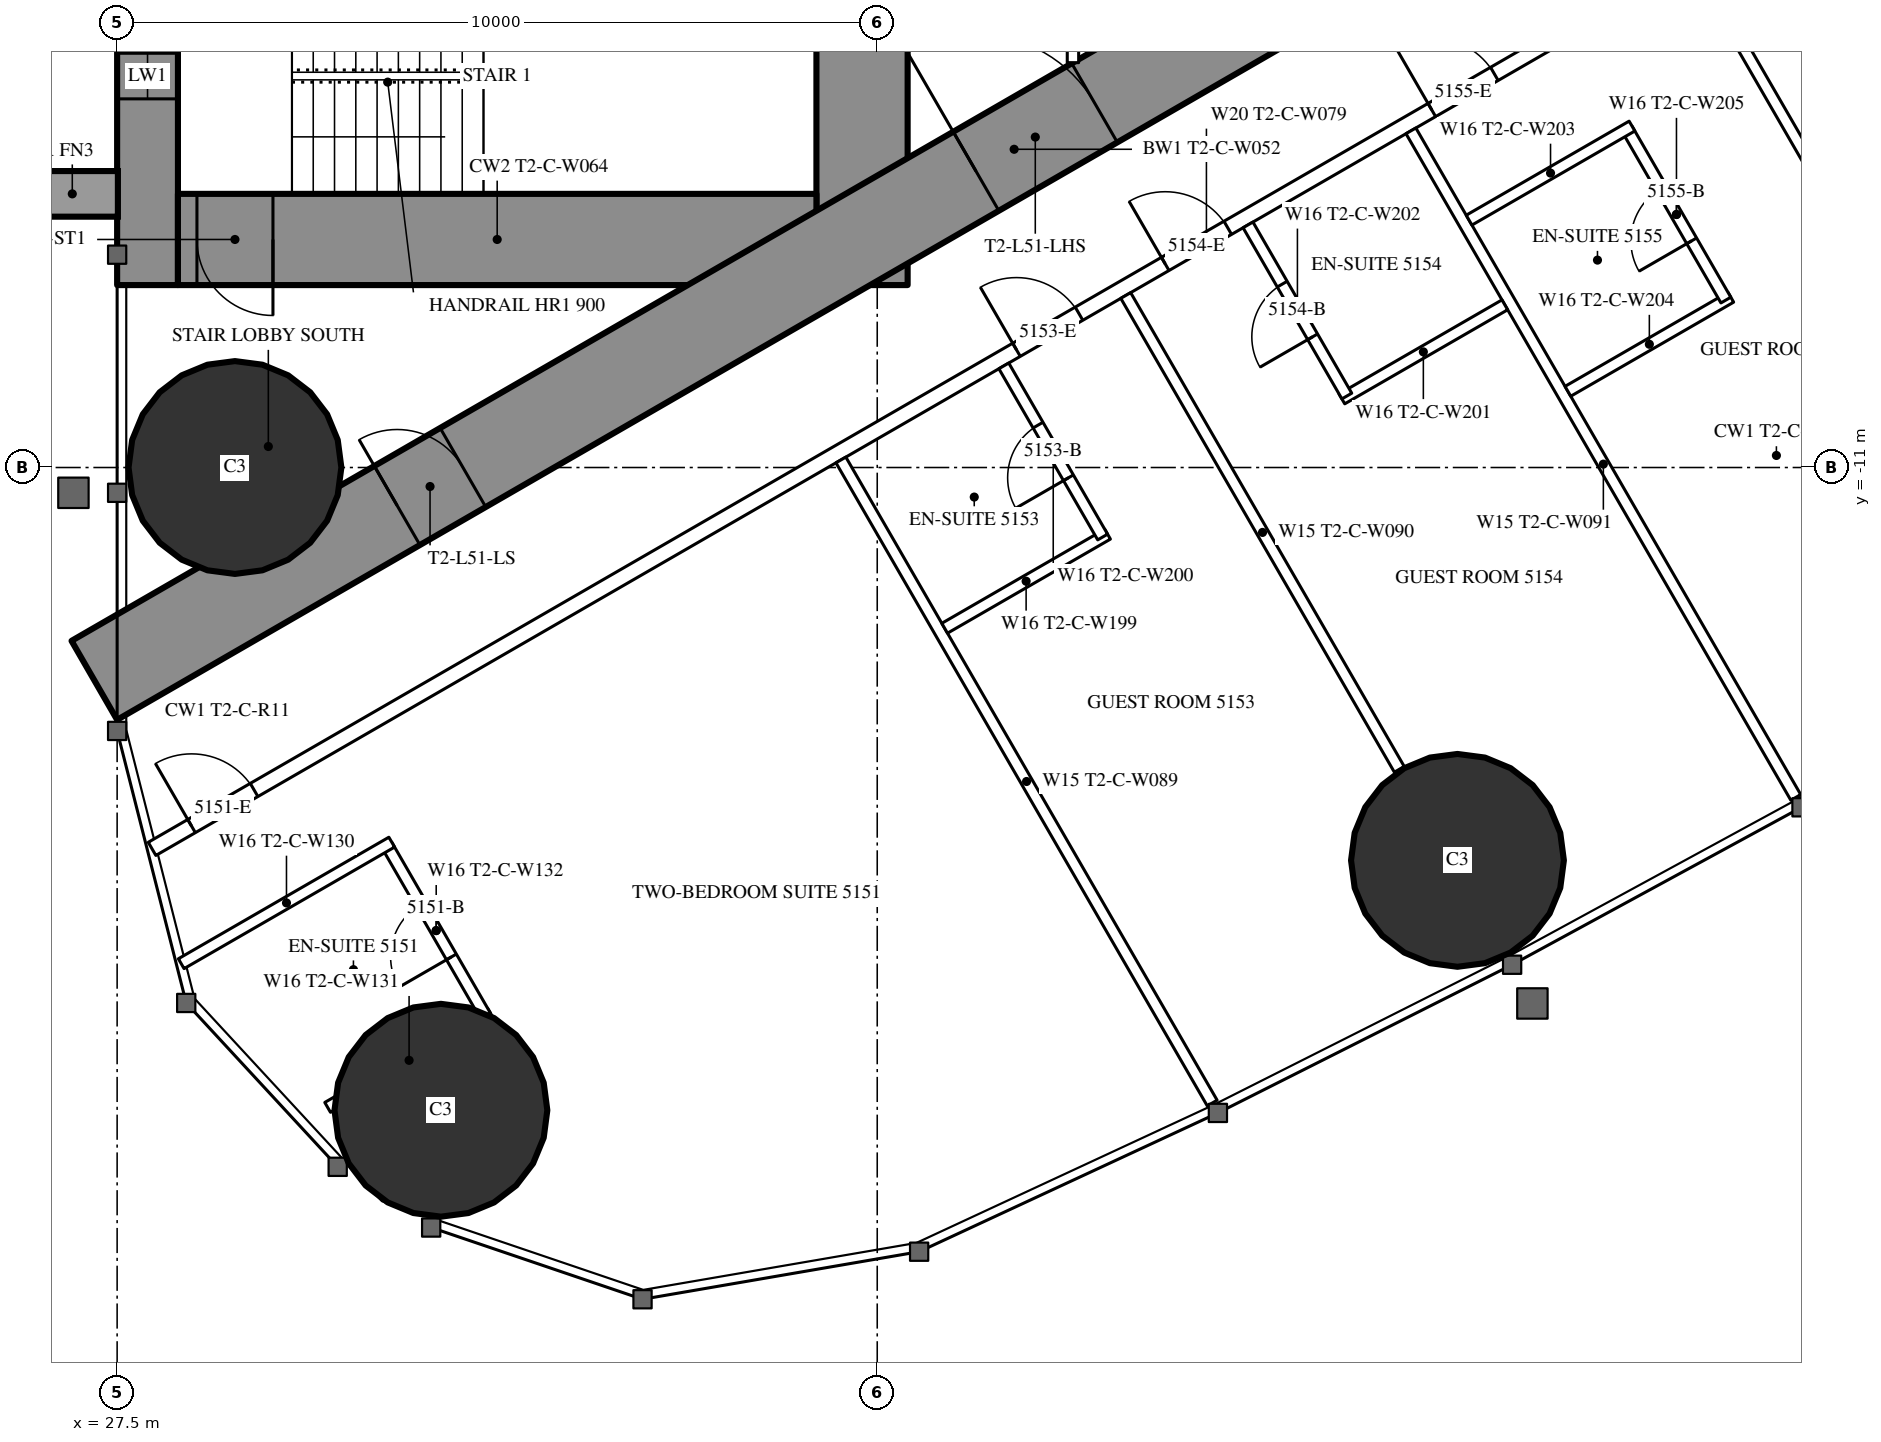
"""IFC4 building model, lengths in metres.
Left out: names, types, materials, properties, quantities, classifications, styles, units other than length and angle.
Written with IfcOpenShell. Run it as: python <this file> out.ifc"""

import sys

from ifc_helpers import new_model, si_unit, direction, frame, frame_2d, origin, origin_2d, place, context, subcontext, project, spatial, rectangle, circle, extrude, element, fill, save


model = new_model("IFC4")
c1 = context("Model", 3, precision=1e-05, world=origin(), true_north=direction((0.0, 1.0)))
c2 = subcontext(c1, "Body", "Model", "MODEL_VIEW")
j1 = project(units=[si_unit("LENGTHUNIT", "METRE"), si_unit("PLANEANGLEUNIT", "RADIAN")], contexts=[c1])
p1 = place(None, origin())
s1 = spatial("IfcSite", under=j1, at=p1, CompositionType="ELEMENT")
p2 = place(p1, origin())
s2 = spatial("IfcBuilding", under=s1, at=p2, CompositionType="ELEMENT")
p3 = place(p2, frame((0.0, 0.0, 191.3)))
s3 = spatial("IfcBuildingStorey", under=s2, at=p3, CompositionType="ELEMENT", Elevation=191.3)
for number, where, z_axis, x_axis in (
    (1, (31.76, -19.456, 0.0), (0.0, 0.0, 1.0), (1.0, 0.0, 0.0)),
    (2, (29.05, -11.0, 0.0), (0.0, 0.0, 1.0), (1.0, 0.0, 0.0)),
    (3, (45.134, -16.168, 0.0), (0.0, 0.0, 1.0), (1.0, 0.0, 0.0)),
):
    element("IfcColumn", number, at=place(p3, frame(where, z_axis=z_axis, x_axis=x_axis)), inside=s3, PredefinedType="COLUMN", context=c2, shape_type="SweptSolid", body=[
        extrude(circle(Radius=1.4, at=origin_2d()), origin(), (0.0, 0.0, 1.0), 3.5),
    ])
p4 = place(p3, frame((27.9, -8.6, 0.0), z_axis=(0.0, 0.0, 1.0), x_axis=(0.0, 1.0, 0.0)))
e4 = element("IfcWall", 4, at=p4, inside=s3, PredefinedType="SHEAR", context=c2, shape_type="SweptSolid", body=[
    extrude(rectangle(XDim=17.2, YDim=0.8, at=frame_2d((8.6, 0.0))), origin(), (0.0, 0.0, 1.0), 3.5),
])
p5 = place(p4, frame((2.45, 0.0, 0.6)))
e5 = element("IfcOpeningElement", 5, at=p5, cuts=e4, PredefinedType="OPENING", context=c2, shape_type="SweptSolid", body=[
    extrude(rectangle(XDim=0.6, YDim=2.1, at=frame_2d((0.3, 1.05))), frame((0.0, 0.41, 0.0), z_axis=(0.0, -1.0, 0.0), x_axis=(1.0, 0.0, 0.0)), (0.0, 0.0, 1.0), 0.82),
])
p6 = place(p4, frame((14.15, 0.0, 0.6)))
e6 = element("IfcOpeningElement", 6, at=p6, cuts=e4, PredefinedType="OPENING", context=c2, shape_type="SweptSolid", body=[
    extrude(rectangle(XDim=0.6, YDim=2.1, at=frame_2d((0.3, 1.05))), frame((0.0, 0.41, 0.0), z_axis=(0.0, -1.0, 0.0), x_axis=(1.0, 0.0, 0.0)), (0.0, 0.0, 1.0), 0.82),
])
p7 = place(p3, frame((37.3, -8.6, 0.0), z_axis=(0.0, 0.0, 1.0), x_axis=(0.0, 1.0, 0.0)))
e7 = element("IfcWall", 7, at=p7, inside=s3, PredefinedType="SHEAR", context=c2, shape_type="SweptSolid", body=[
    extrude(rectangle(XDim=17.2, YDim=1.2, at=frame_2d((8.6, 0.0))), origin(), (0.0, 0.0, 1.0), 3.5),
])
p8 = place(p7, frame((7.7, 0.0, 0.0)))
e8 = element("IfcOpeningElement", 8, at=p8, cuts=e7, PredefinedType="OPENING", context=c2, shape_type="SweptSolid", body=[
    extrude(rectangle(XDim=1.8, YDim=2.2, at=frame_2d((0.9, 1.1))), frame((0.0, 0.61, 0.0), z_axis=(0.0, -1.0, 0.0), x_axis=(1.0, 0.0, 0.0)), (0.0, 0.0, 1.0), 1.22),
])
p9 = place(p3, frame((28.3, -8.0, 0.0), z_axis=(0.0, 0.0, 1.0), x_axis=(1.0, 0.0, 0.0)))
e9 = element("IfcWall", 9, at=p9, inside=s3, PredefinedType="SHEAR", context=c2, shape_type="SweptSolid", body=[
    extrude(rectangle(XDim=8.4, YDim=1.2, at=frame_2d((4.2, 0.0))), origin(), (0.0, 0.0, 1.0), 3.5),
])
p10 = place(p9, frame((0.25, 0.0, 0.0)))
e10 = element("IfcOpeningElement", 10, at=p10, cuts=e9, PredefinedType="OPENING", context=c2, shape_type="SweptSolid", body=[
    extrude(rectangle(XDim=1.0, YDim=2.2, at=frame_2d((0.5, 1.1))), frame((0.0, 0.61, 0.0), z_axis=(0.0, -1.0, 0.0), x_axis=(1.0, 0.0, 0.0)), (0.0, 0.0, 1.0), 1.22),
])
p11 = place(p3, frame((27.2, -13.8, 0.0), z_axis=(0.0, 0.0, 1.0), x_axis=(0.866027159892, 0.499996958321, 0.0)))
e11 = element("IfcWall", 11, at=p11, inside=s3, PredefinedType="SHEAR", context=c2, shape_type="SweptSolid", body=[
    extrude(rectangle(XDim=27.947, YDim=1.2, at=frame_2d((13.973, 0.0))), origin(), (0.0, 0.0, 1.0), 3.5),
])
p12 = place(p11, frame((4.6, 0.0, 0.0)))
e12 = element("IfcOpeningElement", 12, at=p12, cuts=e11, PredefinedType="OPENING", context=c2, shape_type="SweptSolid", body=[
    extrude(rectangle(XDim=1.0, YDim=2.2, at=frame_2d((0.5, 1.1))), frame((0.0, 0.61, 0.0), z_axis=(0.0, -1.0, 0.0), x_axis=(1.0, 0.0, 0.0)), (0.0, 0.0, 1.0), 1.22),
])
p13 = place(p11, frame((13.395, 0.0, 0.0)))
e13 = element("IfcOpeningElement", 13, at=p13, cuts=e11, PredefinedType="OPENING", context=c2, shape_type="SweptSolid", body=[
    extrude(rectangle(XDim=1.8, YDim=2.2, at=frame_2d((0.9, 1.1))), frame((0.0, 0.61, 0.0), z_axis=(0.0, -1.0, 0.0), x_axis=(1.0, 0.0, 0.0)), (0.0, 0.0, 1.0), 1.22),
])
p14 = place(p3, frame((27.959, -16.017, 0.0), z_axis=(0.0, 0.0, 1.0), x_axis=(0.866024151371, 0.500002169237, 0.0)))
e14 = element("IfcWall", 14, at=p14, inside=s3, PredefinedType="PARTITIONING", context=c2, shape_type="SweptSolid", body=[
    extrude(rectangle(XDim=32.034, YDim=0.2, at=frame_2d((16.017, 0.0))), origin(), (0.0, 0.0, 1.0), 3.25),
])
p15 = place(p14, frame((0.6, 0.0, 0.0)))
e15 = element("IfcOpeningElement", 15, at=p15, cuts=e14, PredefinedType="OPENING", context=c2, shape_type="SweptSolid", body=[
    extrude(rectangle(XDim=0.95, YDim=2.2, at=frame_2d((0.475, 1.1))), frame((0.0, 0.11, 0.0), z_axis=(0.0, -1.0, 0.0), x_axis=(1.0, 0.0, 0.0)), (0.0, 0.0, 1.0), 0.22),
])
p16 = place(p14, frame((13.132, 0.0, 0.0)))
e16 = element("IfcOpeningElement", 16, at=p16, cuts=e14, PredefinedType="OPENING", context=c2, shape_type="SweptSolid", body=[
    extrude(rectangle(XDim=0.95, YDim=2.2, at=frame_2d((0.475, 1.1))), frame((0.0, 0.11, 0.0), z_axis=(0.0, -1.0, 0.0), x_axis=(1.0, 0.0, 0.0)), (0.0, 0.0, 1.0), 0.22),
])
p17 = place(p14, frame((15.391, 0.0, 0.0)))
e17 = element("IfcOpeningElement", 17, at=p17, cuts=e14, PredefinedType="OPENING", context=c2, shape_type="SweptSolid", body=[
    extrude(rectangle(XDim=0.95, YDim=2.2, at=frame_2d((0.475, 1.1))), frame((0.0, 0.11, 0.0), z_axis=(0.0, -1.0, 0.0), x_axis=(1.0, 0.0, 0.0)), (0.0, 0.0, 1.0), 0.22),
])
p18 = place(p14, frame((19.441, 0.0, 0.0)))
e18 = element("IfcOpeningElement", 18, at=p18, cuts=e14, PredefinedType="OPENING", context=c2, shape_type="SweptSolid", body=[
    extrude(rectangle(XDim=0.95, YDim=2.2, at=frame_2d((0.475, 1.1))), frame((0.0, 0.11, 0.0), z_axis=(0.0, -1.0, 0.0), x_axis=(1.0, 0.0, 0.0)), (0.0, 0.0, 1.0), 0.22),
])
p19 = place(p14, frame((26.406, 0.0, 0.0)))
e19 = element("IfcOpeningElement", 19, at=p19, cuts=e14, PredefinedType="OPENING", context=c2, shape_type="SweptSolid", body=[
    extrude(rectangle(XDim=0.95, YDim=2.2, at=frame_2d((0.475, 1.1))), frame((0.0, 0.11, 0.0), z_axis=(0.0, -1.0, 0.0), x_axis=(1.0, 0.0, 0.0)), (0.0, 0.0, 1.0), 0.22),
])
p20 = place(p14, frame((28.87, 0.0, 0.0)))
e20 = element("IfcOpeningElement", 20, at=p20, cuts=e14, PredefinedType="OPENING", context=c2, shape_type="SweptSolid", body=[
    extrude(rectangle(XDim=1.8, YDim=2.2, at=frame_2d((0.9, 1.1))), frame((0.0, 0.11, 0.0), z_axis=(0.0, -1.0, 0.0), x_axis=(1.0, 0.0, 0.0)), (0.0, 0.0, 1.0), 0.22),
])
p21 = place(p3, frame((37.022, -10.9, 0.0), z_axis=(0.0, 0.0, 1.0), x_axis=(0.499998620953, -0.866026199976, 0.0)))
e21 = element("IfcWall", 21, at=p21, inside=s3, PredefinedType="PARTITIONING", context=c2, shape_type="SweptSolid", body=[
    extrude(rectangle(XDim=9.77, YDim=0.15, at=frame_2d((4.885, 0.0))), origin(), (0.0, 0.0, 1.0), 3.25),
])
p22 = place(p3, frame((40.769, -8.737, 0.0), z_axis=(0.0, 0.0, 1.0), x_axis=(0.500013115284, -0.866017831539, 0.0)))
e22 = element("IfcWall", 22, at=p22, inside=s3, PredefinedType="PARTITIONING", context=c2, shape_type="SweptSolid", body=[
    extrude(rectangle(XDim=7.198, YDim=0.15, at=frame_2d((3.599, 0.0))), origin(), (0.0, 0.0, 1.0), 2.3),
])
p23 = place(p3, frame((44.521, -6.571, 0.0), z_axis=(0.0, 0.0, 1.0), x_axis=(0.500010457486, -0.866019366068, 0.0)))
e23 = element("IfcWall", 23, at=p23, inside=s3, PredefinedType="PARTITIONING", context=c2, shape_type="SweptSolid", body=[
    extrude(rectangle(XDim=10.126, YDim=0.15, at=frame_2d((5.063, 0.0))), origin(), (0.0, 0.0, 1.0), 3.25),
])
p24 = place(p3, frame((48.275, -4.404, 0.0), z_axis=(0.0, 0.0, 1.0), x_axis=(0.500006004368, -0.866021937133, 0.0)))
e24 = element("IfcWall", 24, at=p24, inside=s3, PredefinedType="PARTITIONING", context=c2, shape_type="SweptSolid", body=[
    extrude(rectangle(XDim=7.279, YDim=0.15, at=frame_2d((3.64, 0.0))), origin(), (0.0, 0.0, 1.0), 2.3),
])
p25 = place(p3, frame((30.269, -19.418, 0.0), z_axis=(0.0, 0.0, 1.0), x_axis=(0.866006523861, 0.500032699561, 0.0)))
e25 = element("IfcWall", 25, at=p25, inside=s3, PredefinedType="PARTITIONING", context=c2, shape_type="SweptSolid", body=[
    extrude(rectangle(XDim=2.475, YDim=0.15, at=frame_2d((1.237, 0.0))), origin(), (0.0, 0.0, 1.0), 3.25),
])
p26 = place(p3, frame((31.048, -15.966, 0.0), z_axis=(0.0, 0.0, 1.0), x_axis=(0.499936506574, -0.866062058628, 0.0)))
e26 = element("IfcWall", 26, at=p26, inside=s3, PredefinedType="PARTITIONING", context=c2, shape_type="SweptSolid", body=[
    extrude(rectangle(XDim=2.6, YDim=0.15, at=frame_2d((1.3, 0.0))), origin(), (0.0, 0.0, 1.0), 2.3),
])
p27 = place(p26, frame((0.9, 0.0, 0.0)))
e27 = element("IfcOpeningElement", 27, at=p27, cuts=e26, PredefinedType="OPENING", context=c2, shape_type="SweptSolid", body=[
    extrude(rectangle(XDim=0.8, YDim=2.2, at=frame_2d((0.4, 1.1))), frame((0.0, 0.085, 0.0), z_axis=(0.0, -1.0, 0.0), x_axis=(1.0, 0.0, 0.0)), (0.0, 0.0, 1.0), 0.17),
])
p28 = place(p3, frame((28.343, -17.528, 0.0), z_axis=(0.0, 0.0, 1.0), x_axis=(0.86600760081, 0.500030834389, 0.0)))
e28 = element("IfcWall", 28, at=p28, inside=s3, PredefinedType="PARTITIONING", context=c2, shape_type="SweptSolid", body=[
    extrude(rectangle(XDim=3.198, YDim=0.15, at=frame_2d((1.599, 0.0))), origin(), (0.0, 0.0, 1.0), 3.25),
])
p29 = place(p3, frame((38.387, -13.115, 0.0), z_axis=(0.0, 0.0, 1.0), x_axis=(0.866073894602, 0.499916002032, 0.0)))
e29 = element("IfcWall", 29, at=p29, inside=s3, PredefinedType="PARTITIONING", context=c2, shape_type="SweptSolid", body=[
    extrude(rectangle(XDim=2.475, YDim=0.15, at=frame_2d((1.238, 0.0))), origin(), (0.0, 0.0, 1.0), 3.25),
])
p30 = place(p3, frame((39.166, -9.663, 0.0), z_axis=(0.0, 0.0, 1.0), x_axis=(0.500006934395, -0.866021400173, 0.0)))
e30 = element("IfcWall", 30, at=p30, inside=s3, PredefinedType="PARTITIONING", context=c2, shape_type="SweptSolid", body=[
    extrude(rectangle(XDim=2.6, YDim=0.15, at=frame_2d((1.3, 0.0))), origin(), (0.0, 0.0, 1.0), 3.25),
])
p31 = place(p30, frame((0.9, 0.0, 0.0)))
e31 = element("IfcOpeningElement", 31, at=p31, cuts=e30, PredefinedType="OPENING", context=c2, shape_type="SweptSolid", body=[
    extrude(rectangle(XDim=0.8, YDim=2.2, at=frame_2d((0.4, 1.1))), frame((0.0, 0.085, 0.0), z_axis=(0.0, -1.0, 0.0), x_axis=(1.0, 0.0, 0.0)), (0.0, 0.0, 1.0), 0.17),
])
p32 = place(p3, frame((43.613, -10.097, 0.0), z_axis=(0.0, 0.0, 1.0), x_axis=(0.866031185235, 0.4999899861, 0.0)))
e32 = element("IfcWall", 32, at=p32, inside=s3, PredefinedType="PARTITIONING", context=c2, shape_type="SweptSolid", body=[
    extrude(rectangle(XDim=2.475, YDim=0.15, at=frame_2d((1.238, 0.0))), origin(), (0.0, 0.0, 1.0), 3.25),
])
p33 = place(p3, frame((42.378, -7.808, 0.0), z_axis=(0.0, 0.0, 1.0), x_axis=(0.500006934395, -0.866021400173, 0.0)))
e33 = element("IfcWall", 33, at=p33, inside=s3, PredefinedType="PARTITIONING", context=c2, shape_type="SweptSolid", body=[
    extrude(rectangle(XDim=2.6, YDim=0.15, at=frame_2d((1.3, 0.0))), origin(), (0.0, 0.0, 1.0), 3.25),
])
p34 = place(p33, frame((0.9, 0.0, 0.0)))
e34 = element("IfcOpeningElement", 34, at=p34, cuts=e33, PredefinedType="OPENING", context=c2, shape_type="SweptSolid", body=[
    extrude(rectangle(XDim=0.8, YDim=2.2, at=frame_2d((0.4, 1.1))), frame((0.0, 0.085, 0.0), z_axis=(0.0, -1.0, 0.0), x_axis=(1.0, 0.0, 0.0)), (0.0, 0.0, 1.0), 0.17),
])
p35 = place(p3, frame((46.586, -9.997, 0.0), z_axis=(0.0, 0.0, 1.0), x_axis=(0.866006523861, 0.500032699561, 0.0)))
e35 = element("IfcWall", 35, at=p35, inside=s3, PredefinedType="PARTITIONING", context=c2, shape_type="SweptSolid", body=[
    extrude(rectangle(XDim=2.475, YDim=0.15, at=frame_2d((1.237, 0.0))), origin(), (0.0, 0.0, 1.0), 3.25),
])
p36 = place(p3, frame((47.365, -6.546, 0.0), z_axis=(0.0, 0.0, 1.0), x_axis=(0.500006934395, -0.866021400173, 0.0)))
e36 = element("IfcWall", 36, at=p36, inside=s3, PredefinedType="PARTITIONING", context=c2, shape_type="SweptSolid", body=[
    extrude(rectangle(XDim=2.6, YDim=0.15, at=frame_2d((1.3, 0.0))), origin(), (0.0, 0.0, 1.0), 3.25),
])
p37 = place(p36, frame((0.9, 0.0, 0.0)))
e37 = element("IfcOpeningElement", 37, at=p37, cuts=e36, PredefinedType="OPENING", context=c2, shape_type="SweptSolid", body=[
    extrude(rectangle(XDim=0.8, YDim=2.2, at=frame_2d((0.4, 1.1))), frame((0.0, 0.085, 0.0), z_axis=(0.0, -1.0, 0.0), x_axis=(1.0, 0.0, 0.0)), (0.0, 0.0, 1.0), 0.17),
])
p38 = place(p3, frame((45.286, -7.746, 0.0), z_axis=(0.0, 0.0, 1.0), x_axis=(0.866006523861, 0.500032699561, 0.0)))
e38 = element("IfcWall", 38, at=p38, inside=s3, PredefinedType="PARTITIONING", context=c2, shape_type="SweptSolid", body=[
    extrude(rectangle(XDim=2.475, YDim=0.15, at=frame_2d((1.237, 0.0))), origin(), (0.0, 0.0, 1.0), 3.25),
])
p39 = place(p3, frame((40.075, -5.674, 0.0), z_axis=(0.0, 0.0, 1.0), x_axis=(0.0, 1.0, 0.0)))
e39 = element("IfcWall", 39, at=p39, inside=s3, PredefinedType="PARTITIONING", context=c2, shape_type="SweptSolid", body=[
    extrude(rectangle(XDim=6.874, YDim=0.15, at=frame_2d((3.437, 0.0))), origin(), (0.0, 0.0, 1.0), 3.25),
])
p40 = place(p39, frame((2.537, 0.0, 0.0)))
e40 = element("IfcOpeningElement", 40, at=p40, cuts=e39, PredefinedType="OPENING", context=c2, shape_type="SweptSolid", body=[
    extrude(rectangle(XDim=1.8, YDim=2.2, at=frame_2d((0.9, 1.1))), frame((0.0, 0.085, 0.0), z_axis=(0.0, -1.0, 0.0), x_axis=(1.0, 0.0, 0.0)), (0.0, 0.0, 1.0), 0.17),
])
p41 = place(p27, origin())
e41 = element("IfcDoor", 41, at=p41, inside=s3, OperationType="SINGLE_SWING_RIGHT", PredefinedType="DOOR", context=c2, shape_type="SweptSolid", body=[
    extrude(rectangle(XDim=0.8, YDim=2.2, at=frame_2d((0.4, 1.1))), frame((0.0, 0.025, 0.0), z_axis=(0.0, -1.0, 0.0), x_axis=(1.0, 0.0, 0.0)), (0.0, 0.0, 1.0), 0.05),
])
fill(e27, e41)
p42 = place(p15, origin())
e42 = element("IfcDoor", 42, at=p42, inside=s3, OperationType="SINGLE_SWING_LEFT", PredefinedType="DOOR", context=c2, shape_type="SweptSolid", body=[
    extrude(rectangle(XDim=0.95, YDim=2.2, at=frame_2d((0.475, 1.1))), frame((0.0, 0.025, 0.0), z_axis=(0.0, -1.0, 0.0), x_axis=(1.0, 0.0, 0.0)), (0.0, 0.0, 1.0), 0.05),
])
fill(e15, e42)
p43 = place(p31, origin())
e43 = element("IfcDoor", 43, at=p43, inside=s3, OperationType="SINGLE_SWING_RIGHT", PredefinedType="DOOR", context=c2, shape_type="SweptSolid", body=[
    extrude(rectangle(XDim=0.8, YDim=2.2, at=frame_2d((0.4, 1.1))), frame((0.0, 0.025, 0.0), z_axis=(0.0, -1.0, 0.0), x_axis=(1.0, 0.0, 0.0)), (0.0, 0.0, 1.0), 0.05),
])
fill(e31, e43)
p44 = place(p16, origin())
e44 = element("IfcDoor", 44, at=p44, inside=s3, OperationType="SINGLE_SWING_LEFT", PredefinedType="DOOR", context=c2, shape_type="SweptSolid", body=[
    extrude(rectangle(XDim=0.95, YDim=2.2, at=frame_2d((0.475, 1.1))), frame((0.0, 0.025, 0.0), z_axis=(0.0, -1.0, 0.0), x_axis=(1.0, 0.0, 0.0)), (0.0, 0.0, 1.0), 0.05),
])
fill(e16, e44)
p45 = place(p34, origin())
e45 = element("IfcDoor", 45, at=p45, inside=s3, OperationType="SINGLE_SWING_RIGHT", PredefinedType="DOOR", context=c2, shape_type="SweptSolid", body=[
    extrude(rectangle(XDim=0.8, YDim=2.2, at=frame_2d((0.4, 1.1))), frame((0.0, 0.025, 0.0), z_axis=(0.0, -1.0, 0.0), x_axis=(1.0, 0.0, 0.0)), (0.0, 0.0, 1.0), 0.05),
])
fill(e34, e45)
p46 = place(p17, origin())
e46 = element("IfcDoor", 46, at=p46, inside=s3, OperationType="SINGLE_SWING_LEFT", PredefinedType="DOOR", context=c2, shape_type="SweptSolid", body=[
    extrude(rectangle(XDim=0.95, YDim=2.2, at=frame_2d((0.475, 1.1))), frame((0.0, 0.025, 0.0), z_axis=(0.0, -1.0, 0.0), x_axis=(1.0, 0.0, 0.0)), (0.0, 0.0, 1.0), 0.05),
])
fill(e17, e46)
p47 = place(p37, origin())
e47 = element("IfcDoor", 47, at=p47, inside=s3, OperationType="SINGLE_SWING_RIGHT", PredefinedType="DOOR", context=c2, shape_type="SweptSolid", body=[
    extrude(rectangle(XDim=0.8, YDim=2.2, at=frame_2d((0.4, 1.1))), frame((0.0, 0.025, 0.0), z_axis=(0.0, -1.0, 0.0), x_axis=(1.0, 0.0, 0.0)), (0.0, 0.0, 1.0), 0.05),
])
fill(e37, e47)
p48 = place(p18, origin())
e48 = element("IfcDoor", 48, at=p48, inside=s3, OperationType="SINGLE_SWING_LEFT", PredefinedType="DOOR", context=c2, shape_type="SweptSolid", body=[
    extrude(rectangle(XDim=0.95, YDim=2.2, at=frame_2d((0.475, 1.1))), frame((0.0, 0.025, 0.0), z_axis=(0.0, -1.0, 0.0), x_axis=(1.0, 0.0, 0.0)), (0.0, 0.0, 1.0), 0.05),
])
fill(e18, e48)
p49 = place(p12, origin())
e49 = element("IfcDoor", 49, at=p49, inside=s3, OperationType="SINGLE_SWING_LEFT", PredefinedType="DOOR", context=c2, shape_type="SweptSolid", body=[
    extrude(rectangle(XDim=1.0, YDim=2.2, at=frame_2d((0.5, 1.1))), frame((0.0, 0.025, 0.0), z_axis=(0.0, -1.0, 0.0), x_axis=(1.0, 0.0, 0.0)), (0.0, 0.0, 1.0), 0.05),
])
fill(e12, e49)
p50 = place(p13, origin())
e50 = element("IfcDoor", 50, at=p50, inside=s3, OperationType="DOUBLE_DOOR_SINGLE_SWING", PredefinedType="DOOR", context=c2, shape_type="SweptSolid", body=[
    extrude(rectangle(XDim=1.8, YDim=2.2, at=frame_2d((0.9, 1.1))), frame((0.0, 0.025, 0.0), z_axis=(0.0, -1.0, 0.0), x_axis=(1.0, 0.0, 0.0)), (0.0, 0.0, 1.0), 0.05),
])
fill(e13, e50)
p51 = place(p10, origin())
e51 = element("IfcDoor", 51, at=p51, inside=s3, OperationType="SINGLE_SWING_RIGHT", PredefinedType="DOOR", context=c2, shape_type="SweptSolid", body=[
    extrude(rectangle(XDim=1.0, YDim=2.2, at=frame_2d((0.5, 1.1))), frame((0.0, 0.025, 0.0), z_axis=(0.0, -1.0, 0.0), x_axis=(1.0, 0.0, 0.0)), (0.0, 0.0, 1.0), 0.05),
])
fill(e10, e51)
p52 = place(p5, origin())
e52 = element("IfcWindow", 52, at=p52, inside=s3, PartitioningType="SINGLE_PANEL", PredefinedType="WINDOW", context=c2, shape_type="SweptSolid", body=[
    extrude(rectangle(XDim=0.6, YDim=2.1, at=frame_2d((0.3, 1.05))), frame((0.0, 0.03, 0.0), z_axis=(0.0, -1.0, 0.0), x_axis=(1.0, 0.0, 0.0)), (0.0, 0.0, 1.0), 0.06),
])
fill(e5, e52)
save(model, sys.argv[1])
